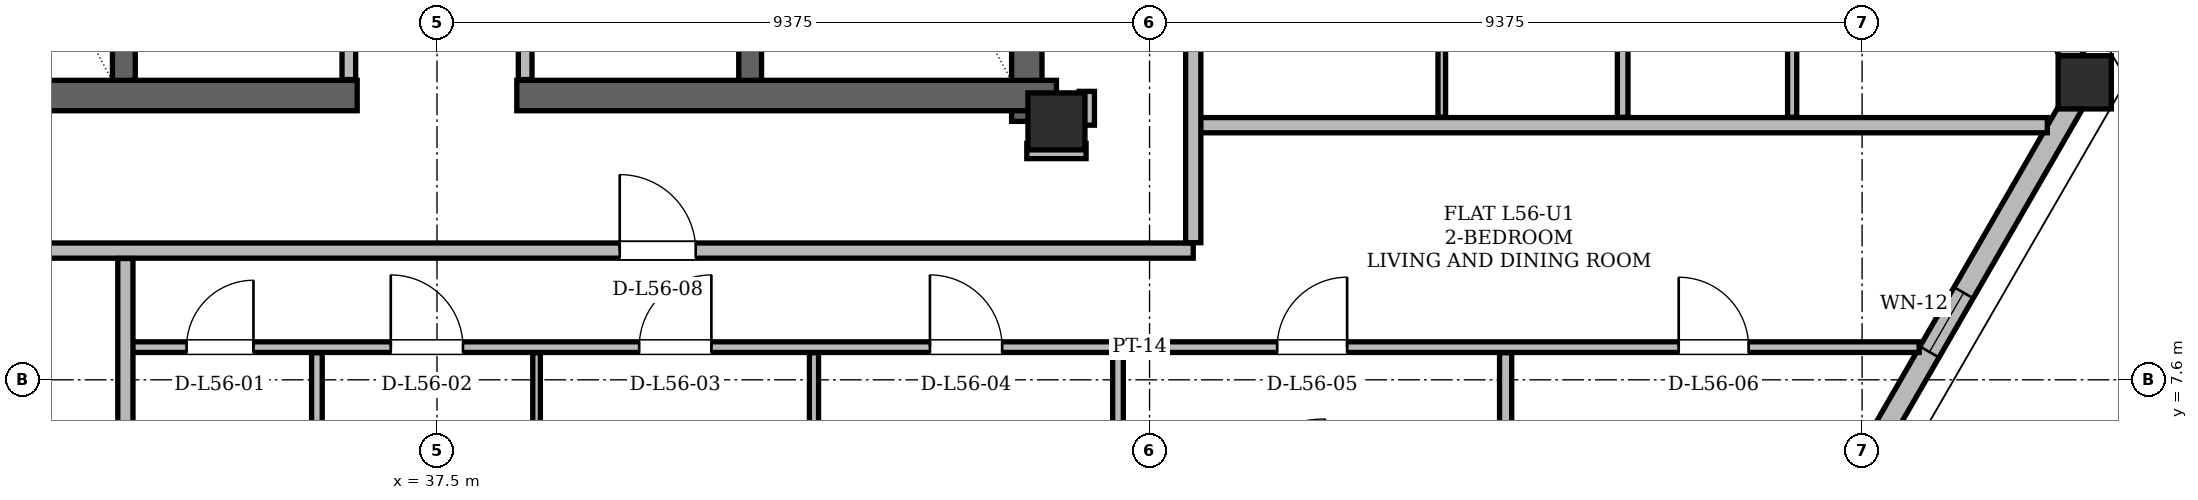
"""IFC4 building model, lengths in metres.
Left out: names, types, materials, properties, quantities, classifications, styles, units other than length and angle.
Written with IfcOpenShell. Run it as: python <this file> out.ifc"""

import sys

from ifc_helpers import new_model, si_unit, direction, frame, frame_2d, origin, origin_2d, place, context, subcontext, project, spatial, rectangle, hollow_rectangle, extrude, element, fill, save


model = new_model("IFC4")
c1 = context("Model", 3, precision=1e-05, world=origin(), true_north=direction((0.0, 1.0)))
c2 = subcontext(c1, "Body", "Model", "MODEL_VIEW")
j1 = project(units=[si_unit("LENGTHUNIT", "METRE"), si_unit("PLANEANGLEUNIT", "RADIAN")], contexts=[c1])
p1 = place(None, origin())
s1 = spatial("IfcSite", under=j1, at=p1, CompositionType="ELEMENT")
p2 = place(p1, origin())
s2 = spatial("IfcBuilding", under=s1, at=p2, CompositionType="ELEMENT")
p3 = place(p2, frame((0.0, 0.0, 212.7)))
s3 = spatial("IfcBuildingStorey", under=s2, at=p3, CompositionType="ELEMENT", Elevation=212.7)
p4 = place(p3, frame((45.65, 11.0, 0.0), z_axis=(0.0, 0.0, 1.0), x_axis=(1.0, 0.0, 0.0)))
e1 = element("IfcColumn", 1, at=p4, inside=s3, PredefinedType="COLUMN", context=c2, shape_type="SweptSolid", body=[
    extrude(hollow_rectangle(XDim=0.75, YDim=0.75, WallThickness=0.06, at=origin_2d()), origin(), (0.0, 0.0, 1.0), 3.6),
])
p5 = place(p3, frame((59.201, 11.543, 0.005), z_axis=(-0.012235746513, -0.016042423206, 0.999796442865), x_axis=(0.795122252878, -0.606449175924, 0.0)))
e2 = element("IfcColumn", 2, at=p5, inside=s3, PredefinedType="COLUMN", context=c2, shape_type="SweptSolid", body=[
    extrude(hollow_rectangle(XDim=0.7, YDim=0.7, WallThickness=0.055, at=origin_2d()), origin(), (0.0, 0.0, 1.0), 3.592),
])
p6 = place(p3, frame((45.26, 11.0, 0.0), z_axis=(0.0, 0.0, 1.0), x_axis=(0.0, 1.0, 0.0)))
e3 = element("IfcWall", 3, at=p6, inside=s3, PredefinedType="SHEAR", context=c2, shape_type="SweptSolid", body=[
    extrude(rectangle(XDim=13.3, YDim=0.4, at=frame_2d((6.65, 0.0))), origin(), (0.0, 0.0, 1.0), 3.38),
])
for number, where, z_axis, x_axis in (
    (4, (29.35, 11.34, 0.0), (0.0, 0.0, 1.0), (1.0, 0.0, 0.0)),
    (5, (38.55, 11.34, 0.0), (0.0, 0.0, 1.0), (1.0, 0.0, 0.0)),
):
    element("IfcWall", number, at=place(p3, frame(where, z_axis=z_axis, x_axis=x_axis)), inside=s3, PredefinedType="SHEAR", context=c2, shape_type="SweptSolid", body=[
        extrude(rectangle(XDim=7.1, YDim=0.4, at=frame_2d((3.55, 0.0))), origin(), (0.0, 0.0, 1.0), 3.38),
    ])
for number, where, z_axis, x_axis in (
    (6, (33.38, 11.54, 0.0), (0.0, 0.0, 1.0), (0.0, 1.0, 0.0)),
    (7, (41.62, 11.54, 0.0), (0.0, 0.0, 1.0), (0.0, 1.0, 0.0)),
):
    element("IfcWall", number, at=place(p3, frame(where, z_axis=z_axis, x_axis=x_axis)), inside=s3, PredefinedType="SHEAR", context=c2, shape_type="SweptSolid", body=[
        extrude(rectangle(XDim=7.62, YDim=0.3, at=frame_2d((3.81, 0.0))), origin(), (0.0, 0.0, 1.0), 3.38),
    ])
p7 = place(p3, frame((55.761, 5.585, 0.0), z_axis=(0.0, 0.0, 1.0), x_axis=(0.499982540895, 0.866035483569, 0.0)))
e8 = element("IfcWall", 8, at=p7, inside=s3, PredefinedType="SOLIDWALL", context=c2, shape_type="SweptSolid", body=[
    extrude(rectangle(XDim=6.88, YDim=0.29, at=frame_2d((3.44, 0.0))), origin(), (0.0, 0.0, 1.0), 2.677),
])
p8 = place(p7, frame((2.75, 0.0, 0.85)))
e9 = element("IfcOpeningElement", 9, at=p8, cuts=e8, PredefinedType="OPENING", context=c2, shape_type="SweptSolid", body=[
    extrude(rectangle(XDim=0.9, YDim=1.15, at=frame_2d((0.45, 0.575))), frame((0.0, 0.145, 0.0), z_axis=(0.0, -1.0, 0.0), x_axis=(1.0, 0.0, 0.0)), (0.0, 0.0, 1.0), 0.29),
])
p9 = place(p3, frame((59.201, 11.543, 0.0), z_axis=(0.0, 0.0, 1.0), x_axis=(-0.499999040053, 0.866025958009, 0.0)))
e10 = element("IfcWall", 10, at=p9, inside=s3, PredefinedType="SOLIDWALL", context=c2, shape_type="SweptSolid", body=[
    extrude(rectangle(XDim=36.523, YDim=0.29, at=frame_2d((18.261, 0.0))), origin(), (0.0, 0.0, 1.0), 2.677),
])
p10 = place(p9, frame((8.034, 0.0, 0.0)))
e11 = element("IfcOpeningElement", 11, at=p10, cuts=e10, PredefinedType="OPENING", context=c2, shape_type="SweptSolid", body=[
    extrude(rectangle(XDim=1.5, YDim=2.2, at=frame_2d((0.75, 1.1))), frame((0.0, 0.145, 0.0), z_axis=(0.0, -1.0, 0.0), x_axis=(1.0, 0.0, 0.0)), (0.0, 0.0, 1.0), 0.29),
])
p11 = place(p9, frame((31.594, 0.0, 0.0)))
e12 = element("IfcOpeningElement", 12, at=p11, cuts=e10, PredefinedType="OPENING", context=c2, shape_type="SweptSolid", body=[
    extrude(rectangle(XDim=1.5, YDim=2.2, at=frame_2d((0.75, 1.1))), frame((0.0, 0.145, 0.0), z_axis=(0.0, -1.0, 0.0), x_axis=(1.0, 0.0, 0.0)), (0.0, 0.0, 1.0), 0.29),
])
p12 = place(p9, frame((12.291, 0.0, 0.85)))
e13 = element("IfcOpeningElement", 13, at=p12, cuts=e10, PredefinedType="OPENING", context=c2, shape_type="SweptSolid", body=[
    extrude(rectangle(XDim=1.4, YDim=1.6, at=frame_2d((0.7, 0.8))), frame((0.0, 0.145, 0.0), z_axis=(0.0, -1.0, 0.0), x_axis=(1.0, 0.0, 0.0)), (0.0, 0.0, 1.0), 0.29),
])
p13 = place(p9, frame((2.252, 0.0, 0.85)))
e14 = element("IfcOpeningElement", 14, at=p13, cuts=e10, PredefinedType="OPENING", context=c2, shape_type="SweptSolid", body=[
    extrude(rectangle(XDim=1.2, YDim=1.48, at=frame_2d((0.6, 0.74))), frame((0.0, 0.145, 0.0), z_axis=(0.0, -1.0, 0.0), x_axis=(1.0, 0.0, 0.0)), (0.0, 0.0, 1.0), 0.29),
])
p14 = place(p9, frame((16.093, 0.0, 0.85)))
e15 = element("IfcOpeningElement", 15, at=p14, cuts=e10, PredefinedType="OPENING", context=c2, shape_type="SweptSolid", body=[
    extrude(rectangle(XDim=3.0, YDim=1.717, at=frame_2d((1.5, 0.858))), frame((0.0, 0.145, 0.0), z_axis=(0.0, -1.0, 0.0), x_axis=(1.0, 0.0, 0.0)), (0.0, 0.0, 1.0), 0.29),
])
p15 = place(p9, frame((23.458, 0.0, 0.85)))
e16 = element("IfcOpeningElement", 16, at=p15, cuts=e10, PredefinedType="OPENING", context=c2, shape_type="SweptSolid", body=[
    extrude(rectangle(XDim=1.2, YDim=1.48, at=frame_2d((0.6, 0.74))), frame((0.0, 0.145, 0.0), z_axis=(0.0, -1.0, 0.0), x_axis=(1.0, 0.0, 0.0)), (0.0, 0.0, 1.0), 0.29),
])
p16 = place(p9, frame((34.061, 0.0, 0.85)))
e17 = element("IfcOpeningElement", 17, at=p16, cuts=e10, PredefinedType="OPENING", context=c2, shape_type="SweptSolid", body=[
    extrude(rectangle(XDim=1.2, YDim=1.48, at=frame_2d((0.6, 0.74))), frame((0.0, 0.145, 0.0), z_axis=(0.0, -1.0, 0.0), x_axis=(1.0, 0.0, 0.0)), (0.0, 0.0, 1.0), 0.29),
])
p17 = place(p3, frame((34.06, 43.173, 0.0), z_axis=(0.0, 0.0, 1.0), x_axis=(-0.499999040053, -0.866025958009, 0.0)))
e18 = element("IfcWall", 18, at=p17, inside=s3, PredefinedType="SOLIDWALL", context=c2, shape_type="SweptSolid", body=[
    extrude(rectangle(XDim=36.523, YDim=0.29, at=frame_2d((18.261, 0.0))), origin(), (0.0, 0.0, 1.0), 2.677),
])
p18 = place(p17, frame((8.034, 0.0, 0.0)))
e19 = element("IfcOpeningElement", 19, at=p18, cuts=e18, PredefinedType="OPENING", context=c2, shape_type="SweptSolid", body=[
    extrude(rectangle(XDim=1.5, YDim=2.2, at=frame_2d((0.75, 1.1))), frame((0.0, 0.145, 0.0), z_axis=(0.0, -1.0, 0.0), x_axis=(1.0, 0.0, 0.0)), (0.0, 0.0, 1.0), 0.29),
])
p19 = place(p17, frame((28.233, 0.0, 0.0)))
e20 = element("IfcOpeningElement", 20, at=p19, cuts=e18, PredefinedType="OPENING", context=c2, shape_type="SweptSolid", body=[
    extrude(rectangle(XDim=1.5, YDim=2.2, at=frame_2d((0.75, 1.1))), frame((0.0, 0.145, 0.0), z_axis=(0.0, -1.0, 0.0), x_axis=(1.0, 0.0, 0.0)), (0.0, 0.0, 1.0), 0.29),
])
p20 = place(p17, frame((32.257, 0.0, 0.85)))
e21 = element("IfcOpeningElement", 21, at=p20, cuts=e18, PredefinedType="OPENING", context=c2, shape_type="SweptSolid", body=[
    extrude(rectangle(XDim=2.2, YDim=1.717, at=frame_2d((1.1, 0.858))), frame((0.0, 0.145, 0.0), z_axis=(0.0, -1.0, 0.0), x_axis=(1.0, 0.0, 0.0)), (0.0, 0.0, 1.0), 0.29),
])
p21 = place(p17, frame((22.716, 0.0, 0.85)))
e22 = element("IfcOpeningElement", 22, at=p21, cuts=e18, PredefinedType="OPENING", context=c2, shape_type="SweptSolid", body=[
    extrude(rectangle(XDim=1.2, YDim=1.48, at=frame_2d((0.6, 0.74))), frame((0.0, 0.145, 0.0), z_axis=(0.0, -1.0, 0.0), x_axis=(1.0, 0.0, 0.0)), (0.0, 0.0, 1.0), 0.29),
])
p22 = place(p17, frame((26.483, 0.0, 0.85)))
e23 = element("IfcOpeningElement", 23, at=p22, cuts=e18, PredefinedType="OPENING", context=c2, shape_type="SweptSolid", body=[
    extrude(rectangle(XDim=1.2, YDim=1.48, at=frame_2d((0.6, 0.74))), frame((0.0, 0.145, 0.0), z_axis=(0.0, -1.0, 0.0), x_axis=(1.0, 0.0, 0.0)), (0.0, 0.0, 1.0), 0.29),
])
p23 = place(p3, frame((36.34, 11.55, 0.0), z_axis=(0.0, 0.0, 1.0), x_axis=(0.0, 1.0, 0.0)))
e24 = element("IfcWall", 24, at=p23, inside=s3, PredefinedType="PARTITIONING", context=c2, shape_type="SweptSolid", body=[
    extrude(rectangle(XDim=5.55, YDim=0.18, at=frame_2d((2.775, 0.0))), origin(), (0.0, 0.0, 1.0), 3.38),
])
p24 = place(p23, frame((0.55, 0.0, 0.0)))
e25 = element("IfcOpeningElement", 25, at=p24, cuts=e24, PredefinedType="OPENING", context=c2, shape_type="SweptSolid", body=[
    extrude(rectangle(XDim=0.88, YDim=2.08, at=frame_2d((0.44, 1.04))), frame((0.0, 0.09, 0.0), z_axis=(0.0, -1.0, 0.0), x_axis=(1.0, 0.0, 0.0)), (0.0, 0.0, 1.0), 0.18),
])
p25 = place(p23, frame((3.25, 0.0, 0.0)))
e26 = element("IfcOpeningElement", 26, at=p25, cuts=e24, PredefinedType="OPENING", context=c2, shape_type="SweptSolid", body=[
    extrude(rectangle(XDim=0.88, YDim=2.08, at=frame_2d((0.44, 1.04))), frame((0.0, 0.09, 0.0), z_axis=(0.0, -1.0, 0.0), x_axis=(1.0, 0.0, 0.0)), (0.0, 0.0, 1.0), 0.18),
])
p26 = place(p3, frame((38.66, 11.55, 0.0), z_axis=(0.0, 0.0, 1.0), x_axis=(0.0, 1.0, 0.0)))
e27 = element("IfcWall", 27, at=p26, inside=s3, PredefinedType="PARTITIONING", context=c2, shape_type="SweptSolid", body=[
    extrude(rectangle(XDim=5.55, YDim=0.18, at=frame_2d((2.775, 0.0))), origin(), (0.0, 0.0, 1.0), 3.38),
])
p27 = place(p26, frame((1.35, 0.0, 0.0)))
e28 = element("IfcOpeningElement", 28, at=p27, cuts=e27, PredefinedType="OPENING", context=c2, shape_type="SweptSolid", body=[
    extrude(rectangle(XDim=0.88, YDim=2.08, at=frame_2d((0.44, 1.04))), frame((0.0, 0.09, 0.0), z_axis=(0.0, -1.0, 0.0), x_axis=(1.0, 0.0, 0.0)), (0.0, 0.0, 1.0), 0.18),
])
p28 = place(p26, frame((4.1, 0.0, 0.0)))
e29 = element("IfcOpeningElement", 29, at=p28, cuts=e27, PredefinedType="OPENING", context=c2, shape_type="SweptSolid", body=[
    extrude(rectangle(XDim=0.88, YDim=2.08, at=frame_2d((0.44, 1.04))), frame((0.0, 0.09, 0.0), z_axis=(0.0, -1.0, 0.0), x_axis=(1.0, 0.0, 0.0)), (0.0, 0.0, 1.0), 0.18),
])
p29 = place(p3, frame((33.35, 8.03, 0.0), z_axis=(0.0, 0.0, 1.0), x_axis=(1.0, 0.0, 0.0)))
e30 = element("IfcWall", 30, at=p29, inside=s3, PredefinedType="PARTITIONING", context=c2, shape_type="SweptSolid", body=[
    extrude(rectangle(XDim=23.651, YDim=0.14, at=frame_2d((11.826, 0.0))), origin(), (0.0, 0.0, 1.0), 2.913),
])
p30 = place(p29, frame((0.855, 0.0, 0.0)))
e31 = element("IfcOpeningElement", 31, at=p30, cuts=e30, PredefinedType="OPENING", context=c2, shape_type="SweptSolid", body=[
    extrude(rectangle(XDim=0.88, YDim=2.08, at=frame_2d((0.44, 1.04))), frame((0.0, 0.07, 0.0), z_axis=(0.0, -1.0, 0.0), x_axis=(1.0, 0.0, 0.0)), (0.0, 0.0, 1.0), 0.14),
])
p31 = place(p29, frame((3.542, 0.0, 0.0)))
e32 = element("IfcOpeningElement", 32, at=p31, cuts=e30, PredefinedType="OPENING", context=c2, shape_type="SweptSolid", body=[
    extrude(rectangle(XDim=0.95, YDim=2.1, at=frame_2d((0.475, 1.05))), frame((0.0, 0.07, 0.0), z_axis=(0.0, -1.0, 0.0), x_axis=(1.0, 0.0, 0.0)), (0.0, 0.0, 1.0), 0.14),
])
p32 = place(p29, frame((6.81, 0.0, 0.0)))
e33 = element("IfcOpeningElement", 33, at=p32, cuts=e30, PredefinedType="OPENING", context=c2, shape_type="SweptSolid", body=[
    extrude(rectangle(XDim=0.95, YDim=2.1, at=frame_2d((0.475, 1.05))), frame((0.0, 0.07, 0.0), z_axis=(0.0, -1.0, 0.0), x_axis=(1.0, 0.0, 0.0)), (0.0, 0.0, 1.0), 0.14),
])
p33 = place(p29, frame((10.635, 0.0, 0.0)))
e34 = element("IfcOpeningElement", 34, at=p33, cuts=e30, PredefinedType="OPENING", context=c2, shape_type="SweptSolid", body=[
    extrude(rectangle(XDim=0.95, YDim=2.1, at=frame_2d((0.475, 1.05))), frame((0.0, 0.07, 0.0), z_axis=(0.0, -1.0, 0.0), x_axis=(1.0, 0.0, 0.0)), (0.0, 0.0, 1.0), 0.14),
])
p34 = place(p29, frame((15.205, 0.0, 0.0)))
e35 = element("IfcOpeningElement", 35, at=p34, cuts=e30, PredefinedType="OPENING", context=c2, shape_type="SweptSolid", body=[
    extrude(rectangle(XDim=0.92, YDim=2.12, at=frame_2d((0.46, 1.06))), frame((0.0, 0.07, 0.0), z_axis=(0.0, -1.0, 0.0), x_axis=(1.0, 0.0, 0.0)), (0.0, 0.0, 1.0), 0.14),
])
p35 = place(p29, frame((20.487, 0.0, 0.0)))
e36 = element("IfcOpeningElement", 36, at=p35, cuts=e30, PredefinedType="OPENING", context=c2, shape_type="SweptSolid", body=[
    extrude(rectangle(XDim=0.92, YDim=2.12, at=frame_2d((0.46, 1.06))), frame((0.0, 0.07, 0.0), z_axis=(0.0, -1.0, 0.0), x_axis=(1.0, 0.0, 0.0)), (0.0, 0.0, 1.0), 0.14),
])
p36 = place(p3, frame((25.6, 9.3, 0.0), z_axis=(0.0, 0.0, 1.0), x_axis=(1.0, 0.0, 0.0)))
e37 = element("IfcWall", 37, at=p36, inside=s3, PredefinedType="PARTITIONING", context=c2, shape_type="SweptSolid", body=[
    extrude(rectangle(XDim=21.85, YDim=0.2, at=frame_2d((10.925, 0.0))), origin(), (0.0, 0.0, 1.0), 2.913),
])
p37 = place(p36, frame((4.018, 0.0, 0.0)))
e38 = element("IfcOpeningElement", 38, at=p37, cuts=e37, PredefinedType="OPENING", context=c2, shape_type="SweptSolid", body=[
    extrude(rectangle(XDim=1.0, YDim=2.18, at=frame_2d((0.5, 1.09))), frame((0.0, 0.1, 0.0), z_axis=(0.0, -1.0, 0.0), x_axis=(1.0, 0.0, 0.0)), (0.0, 0.0, 1.0), 0.2),
])
p38 = place(p36, frame((14.304, 0.0, 0.0)))
e39 = element("IfcOpeningElement", 39, at=p38, cuts=e37, PredefinedType="OPENING", context=c2, shape_type="SweptSolid", body=[
    extrude(rectangle(XDim=1.0, YDim=2.18, at=frame_2d((0.5, 1.09))), frame((0.0, 0.1, 0.0), z_axis=(0.0, -1.0, 0.0), x_axis=(1.0, 0.0, 0.0)), (0.0, 0.0, 1.0), 0.2),
])
p39 = place(p3, frame((45.26, 10.61, 0.0), z_axis=(0.0, 0.0, 1.0), x_axis=(1.0, 0.0, 0.0)))
e40 = element("IfcWall", 40, at=p39, inside=s3, PredefinedType="PARTITIONING", context=c2, shape_type="SweptSolid", body=[
    extrude(rectangle(XDim=0.78, YDim=0.2, at=frame_2d((0.39, 0.0))), origin(), (0.0, 0.0, 1.0), 3.38),
])
p40 = place(p3, frame((47.45, 10.95, 0.0), z_axis=(0.0, 0.0, 1.0), x_axis=(1.0, 0.0, 0.0)))
e41 = element("IfcWall", 41, at=p40, inside=s3, PredefinedType="PARTITIONING", context=c2, shape_type="SweptSolid", body=[
    extrude(rectangle(XDim=11.237, YDim=0.2, at=frame_2d((5.619, 0.0))), origin(), (0.0, 0.0, 1.0), 2.913),
])
p41 = place(p3, frame((33.4, 5.734, 0.0), z_axis=(0.0, 0.0, 1.0), x_axis=(0.0, 1.0, 0.0)))
e42 = element("IfcWall", 42, at=p41, inside=s3, PredefinedType="PARTITIONING", context=c2, shape_type="SweptSolid", body=[
    extrude(rectangle(XDim=3.462, YDim=0.2, at=frame_2d((1.731, 0.0))), origin(), (0.0, 0.0, 1.0), 3.38),
])
p42 = place(p3, frame((35.92, 5.734, 0.0), z_axis=(0.0, 0.0, 1.0), x_axis=(0.0, 1.0, 0.0)))
e43 = element("IfcWall", 43, at=p42, inside=s3, PredefinedType="PARTITIONING", context=c2, shape_type="SweptSolid", body=[
    extrude(rectangle(XDim=2.222, YDim=0.14, at=frame_2d((1.111, 0.0))), origin(), (0.0, 0.0, 1.0), 3.38),
])
p43 = place(p3, frame((38.81, 5.734, 0.0), z_axis=(0.0, 0.0, 1.0), x_axis=(0.0, 1.0, 0.0)))
e44 = element("IfcWall", 44, at=p43, inside=s3, PredefinedType="PARTITIONING", context=c2, shape_type="SweptSolid", body=[
    extrude(rectangle(XDim=2.222, YDim=0.1, at=frame_2d((1.111, 0.0))), origin(), (0.0, 0.0, 1.0), 3.38),
])
p44 = place(p3, frame((42.46, 5.734, 0.0), z_axis=(0.0, 0.0, 1.0), x_axis=(0.0, 1.0, 0.0)))
e45 = element("IfcWall", 45, at=p44, inside=s3, PredefinedType="PARTITIONING", context=c2, shape_type="SweptSolid", body=[
    extrude(rectangle(XDim=2.222, YDim=0.12, at=frame_2d((1.111, 0.0))), origin(), (0.0, 0.0, 1.0), 3.38),
])
p45 = place(p3, frame((46.05, 10.95, 0.0), z_axis=(0.0, 0.0, 1.0), x_axis=(0.0, 1.0, 0.0)))
e46 = element("IfcWall", 46, at=p45, inside=s3, PredefinedType="PARTITIONING", context=c2, shape_type="SweptSolid", body=[
    extrude(rectangle(XDim=0.445, YDim=0.2, at=frame_2d((0.223, 0.0))), origin(), (0.0, 0.0, 1.0), 2.913),
])
p46 = place(p3, frame((46.46, 5.734, 0.0), z_axis=(0.0, 0.0, 1.0), x_axis=(0.0, 1.0, 0.0)))
e47 = element("IfcWall", 47, at=p46, inside=s3, PredefinedType="PARTITIONING", context=c2, shape_type="SweptSolid", body=[
    extrude(rectangle(XDim=2.222, YDim=0.14, at=frame_2d((1.111, 0.0))), origin(), (0.0, 0.0, 1.0), 3.38),
])
p47 = place(p3, frame((47.45, 9.404, 0.0), z_axis=(0.0, 0.0, 1.0), x_axis=(0.0, 1.0, 0.0)))
e48 = element("IfcWall", 48, at=p47, inside=s3, PredefinedType="PARTITIONING", context=c2, shape_type="SweptSolid", body=[
    extrude(rectangle(XDim=16.462, YDim=0.2, at=frame_2d((8.231, 0.0))), origin(), (0.0, 0.0, 1.0), 2.913),
])
p48 = place(p47, frame((9.496, 0.0, 0.0)))
e49 = element("IfcOpeningElement", 49, at=p48, cuts=e48, PredefinedType="OPENING", context=c2, shape_type="SweptSolid", body=[
    extrude(rectangle(XDim=1.0, YDim=2.18, at=frame_2d((0.5, 1.09))), frame((0.0, 0.1, 0.0), z_axis=(0.0, -1.0, 0.0), x_axis=(1.0, 0.0, 0.0)), (0.0, 0.0, 1.0), 0.2),
])
p49 = place(p3, frame((50.72, 11.054, 0.0), z_axis=(0.0, 0.0, 1.0), x_axis=(0.0, 1.0, 0.0)))
e50 = element("IfcWall", 50, at=p49, inside=s3, PredefinedType="PARTITIONING", context=c2, shape_type="SweptSolid", body=[
    extrude(rectangle(XDim=3.542, YDim=0.1, at=frame_2d((1.771, 0.0))), origin(), (0.0, 0.0, 1.0), 3.38),
])
p50 = place(p3, frame((51.56, 5.734, 0.0), z_axis=(0.0, 0.0, 1.0), x_axis=(0.0, 1.0, 0.0)))
e51 = element("IfcWall", 51, at=p50, inside=s3, PredefinedType="PARTITIONING", context=c2, shape_type="SweptSolid", body=[
    extrude(rectangle(XDim=2.222, YDim=0.16, at=frame_2d((1.111, 0.0))), origin(), (0.0, 0.0, 1.0), 2.913),
])
p51 = place(p3, frame((53.1, 11.054, 0.0), z_axis=(0.0, 0.0, 1.0), x_axis=(0.0, 1.0, 0.0)))
e52 = element("IfcWall", 52, at=p51, inside=s3, PredefinedType="PARTITIONING", context=c2, shape_type="SweptSolid", body=[
    extrude(rectangle(XDim=3.542, YDim=0.14, at=frame_2d((1.771, 0.0))), origin(), (0.0, 0.0, 1.0), 2.913),
])
p52 = place(p3, frame((55.33, 11.054, 0.0), z_axis=(0.0, 0.0, 1.0), x_axis=(0.0, 1.0, 0.0)))
e53 = element("IfcWall", 53, at=p52, inside=s3, PredefinedType="PARTITIONING", context=c2, shape_type="SweptSolid", body=[
    extrude(rectangle(XDim=3.542, YDim=0.12, at=frame_2d((1.771, 0.0))), origin(), (0.0, 0.0, 1.0), 2.913),
])
p53 = place(p8, origin())
e54 = element("IfcWindow", 54, at=p53, inside=s3, PartitioningType="SINGLE_PANEL", PredefinedType="WINDOW", context=c2, shape_type="SweptSolid", body=[
    extrude(rectangle(XDim=0.9, YDim=1.15, at=frame_2d((0.45, 0.575))), frame((0.0, 0.03, 0.0), z_axis=(0.0, -1.0, 0.0), x_axis=(1.0, 0.0, 0.0)), (0.0, 0.0, 1.0), 0.06),
])
fill(e9, e54)
p54 = place(p30, origin())
e55 = element("IfcDoor", 55, at=p54, inside=s3, OperationType="SINGLE_SWING_RIGHT", PredefinedType="DOOR", context=c2, shape_type="SweptSolid", body=[
    extrude(rectangle(XDim=0.88, YDim=2.08, at=frame_2d((0.44, 1.04))), frame((0.0, 0.025, 0.0), z_axis=(0.0, -1.0, 0.0), x_axis=(1.0, 0.0, 0.0)), (0.0, 0.0, 1.0), 0.05),
])
fill(e31, e55)
p55 = place(p31, origin())
e56 = element("IfcDoor", 56, at=p55, inside=s3, OperationType="SINGLE_SWING_LEFT", PredefinedType="DOOR", context=c2, shape_type="SweptSolid", body=[
    extrude(rectangle(XDim=0.95, YDim=2.1, at=frame_2d((0.475, 1.05))), frame((0.0, 0.025, 0.0), z_axis=(0.0, -1.0, 0.0), x_axis=(1.0, 0.0, 0.0)), (0.0, 0.0, 1.0), 0.05),
])
fill(e32, e56)
p56 = place(p32, origin())
e57 = element("IfcDoor", 57, at=p56, inside=s3, OperationType="SINGLE_SWING_RIGHT", PredefinedType="DOOR", context=c2, shape_type="SweptSolid", body=[
    extrude(rectangle(XDim=0.95, YDim=2.1, at=frame_2d((0.475, 1.05))), frame((0.0, 0.025, 0.0), z_axis=(0.0, -1.0, 0.0), x_axis=(1.0, 0.0, 0.0)), (0.0, 0.0, 1.0), 0.05),
])
fill(e33, e57)
p57 = place(p33, origin())
e58 = element("IfcDoor", 58, at=p57, inside=s3, OperationType="SINGLE_SWING_LEFT", PredefinedType="DOOR", context=c2, shape_type="SweptSolid", body=[
    extrude(rectangle(XDim=0.95, YDim=2.1, at=frame_2d((0.475, 1.05))), frame((0.0, 0.025, 0.0), z_axis=(0.0, -1.0, 0.0), x_axis=(1.0, 0.0, 0.0)), (0.0, 0.0, 1.0), 0.05),
])
fill(e34, e58)
p58 = place(p34, origin())
e59 = element("IfcDoor", 59, at=p58, inside=s3, OperationType="SINGLE_SWING_RIGHT", PredefinedType="DOOR", context=c2, shape_type="SweptSolid", body=[
    extrude(rectangle(XDim=0.92, YDim=2.12, at=frame_2d((0.46, 1.06))), frame((0.0, 0.025, 0.0), z_axis=(0.0, -1.0, 0.0), x_axis=(1.0, 0.0, 0.0)), (0.0, 0.0, 1.0), 0.05),
])
fill(e35, e59)
p59 = place(p35, origin())
e60 = element("IfcDoor", 60, at=p59, inside=s3, OperationType="SINGLE_SWING_LEFT", PredefinedType="DOOR", context=c2, shape_type="SweptSolid", body=[
    extrude(rectangle(XDim=0.92, YDim=2.12, at=frame_2d((0.46, 1.06))), frame((0.0, 0.025, 0.0), z_axis=(0.0, -1.0, 0.0), x_axis=(1.0, 0.0, 0.0)), (0.0, 0.0, 1.0), 0.05),
])
fill(e36, e60)
p60 = place(p38, origin())
e61 = element("IfcDoor", 61, at=p60, inside=s3, OperationType="SINGLE_SWING_LEFT", PredefinedType="DOOR", context=c2, shape_type="SweptSolid", body=[
    extrude(rectangle(XDim=1.0, YDim=2.18, at=frame_2d((0.5, 1.09))), frame((0.0, 0.025, 0.0), z_axis=(0.0, -1.0, 0.0), x_axis=(1.0, 0.0, 0.0)), (0.0, 0.0, 1.0), 0.05),
])
fill(e39, e61)
save(model, sys.argv[1])
